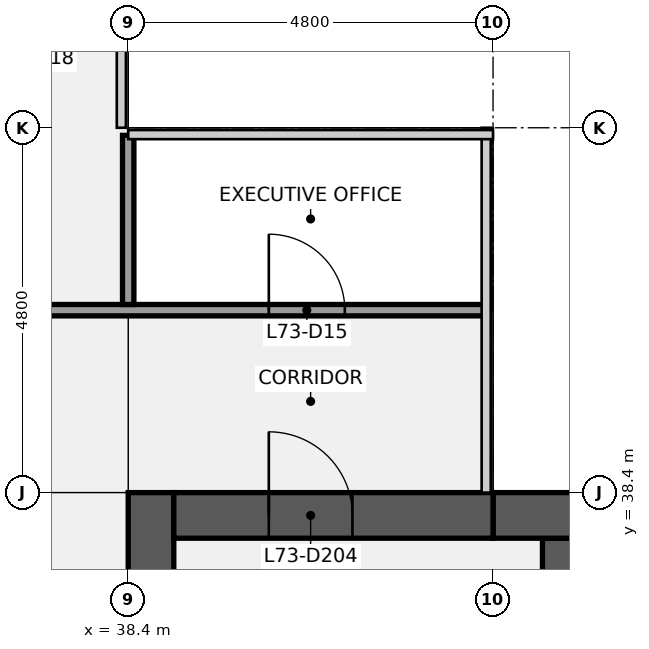
"""IFC4 building model, lengths in metres.
Left out: names, types, materials, properties, quantities, classifications, styles, units other than length and angle.
Written with IfcOpenShell. Run it as: python <this file> out.ifc"""

import sys

from ifc_helpers import new_model, si_unit, direction, frame, frame_2d, origin, place, context, subcontext, project, spatial, rectangle, extrude, element, fill, save


model = new_model("IFC4")
c1 = context("Model", 3, precision=1e-05, world=origin(), true_north=direction((0.0, 1.0)))
c2 = subcontext(c1, "Body", "Model", "MODEL_VIEW")
j1 = project(units=[si_unit("LENGTHUNIT", "METRE"), si_unit("PLANEANGLEUNIT", "RADIAN")], contexts=[c1])
p1 = place(None, origin())
s1 = spatial("IfcSite", under=j1, at=p1, CompositionType="ELEMENT")
p2 = place(p1, origin())
s2 = spatial("IfcBuilding", under=s1, at=p2, CompositionType="ELEMENT")
p3 = place(p2, frame((0.0, 0.0, 330.3)))
s3 = spatial("IfcBuildingStorey", under=s2, at=p3, CompositionType="ELEMENT", Elevation=330.3)
p4 = place(p3, frame((38.7, 9.6, 0.0), z_axis=(0.0, 0.0, 1.0), x_axis=(0.0, 1.0, 0.0)))
e1 = element("IfcWall", 1, at=p4, inside=s3, PredefinedType="SHEAR", context=c2, shape_type="SweptSolid", body=[
    extrude(rectangle(XDim=28.8, YDim=0.6, at=frame_2d((14.4, 0.0))), origin(), (0.0, 0.0, 1.0), 3.84),
])
p5 = place(p4, frame((8.7, 0.0, 0.0)))
e2 = element("IfcOpeningElement", 2, at=p5, cuts=e1, PredefinedType="OPENING", context=c2, shape_type="SweptSolid", body=[
    extrude(rectangle(XDim=1.8, YDim=2.1, at=frame_2d((0.9, 1.05))), frame((0.0, 0.31, 0.0), z_axis=(0.0, -1.0, 0.0), x_axis=(1.0, 0.0, 0.0)), (0.0, 0.0, 1.0), 0.62),
])
p6 = place(p4, frame((18.3, 0.0, 0.0)))
e3 = element("IfcOpeningElement", 3, at=p6, cuts=e1, PredefinedType="OPENING", context=c2, shape_type="SweptSolid", body=[
    extrude(rectangle(XDim=1.8, YDim=2.1, at=frame_2d((0.9, 1.05))), frame((0.0, 0.31, 0.0), z_axis=(0.0, -1.0, 0.0), x_axis=(1.0, 0.0, 0.0)), (0.0, 0.0, 1.0), 0.62),
])
p7 = place(p3, frame((43.85, 37.5, 0.0), z_axis=(0.0, 0.0, 1.0), x_axis=(1.0, 0.0, 0.0)))
e4 = element("IfcWall", 4, at=p7, inside=s3, PredefinedType="SHEAR", context=c2, shape_type="SweptSolid", body=[
    extrude(rectangle(XDim=7.5, YDim=0.6, at=frame_2d((3.75, 0.0))), origin(), (0.0, 0.0, 1.0), 3.84),
])
p8 = place(p3, frame((43.2, 38.1, 0.0), z_axis=(0.0, 0.0, 1.0), x_axis=(1.0, 0.0, 0.0)))
e5 = element("IfcWall", 5, at=p8, inside=s3, PredefinedType="SHEAR", context=c2, shape_type="SweptSolid", body=[
    extrude(rectangle(XDim=13.8, YDim=0.6, at=frame_2d((6.9, 0.0))), origin(), (0.0, 0.0, 1.0), 3.84),
])
p9 = place(p8, frame((6.3, 0.0, 0.9)))
e6 = element("IfcOpeningElement", 6, at=p9, cuts=e5, PredefinedType="OPENING", context=c2, shape_type="SweptSolid", body=[
    extrude(rectangle(XDim=1.8, YDim=1.5, at=frame_2d((0.9, 0.75))), frame((0.0, 0.31, 0.0), z_axis=(0.0, -1.0, 0.0), x_axis=(1.0, 0.0, 0.0)), (0.0, 0.0, 1.0), 0.62),
])
p10 = place(p8, frame((1.5, 0.0, 0.9)))
e7 = element("IfcOpeningElement", 7, at=p10, cuts=e5, PredefinedType="OPENING", context=c2, shape_type="SweptSolid", body=[
    extrude(rectangle(XDim=1.8, YDim=1.5, at=frame_2d((0.9, 0.75))), frame((0.0, 0.31, 0.0), z_axis=(0.0, -1.0, 0.0), x_axis=(1.0, 0.0, 0.0)), (0.0, 0.0, 1.0), 0.62),
])
p11 = place(p3, frame((39.0, 38.1, 0.0), z_axis=(0.0, 0.0, 1.0), x_axis=(1.0, 0.0, 0.0)))
e8 = element("IfcWall", 8, at=p11, inside=s3, PredefinedType="SHEAR", context=c2, shape_type="SweptSolid", body=[
    extrude(rectangle(XDim=4.2, YDim=0.6, at=frame_2d((2.1, 0.0))), origin(), (0.0, 0.0, 1.0), 3.84),
])
p12 = place(p11, frame((1.25, 0.0, 0.0)))
e9 = element("IfcOpeningElement", 9, at=p12, cuts=e8, PredefinedType="OPENING", context=c2, shape_type="SweptSolid", body=[
    extrude(rectangle(XDim=1.1, YDim=2.1, at=frame_2d((0.55, 1.05))), frame((0.0, 0.31, 0.0), z_axis=(0.0, -1.0, 0.0), x_axis=(1.0, 0.0, 0.0)), (0.0, 0.0, 1.0), 0.62),
])
p13 = place(p3, frame((14.5, 40.8, 0.0), z_axis=(0.0, 0.0, 1.0), x_axis=(1.0, 0.0, 0.0)))
e10 = element("IfcWall", 10, at=p13, inside=s3, PredefinedType="PARTITIONING", context=c2, shape_type="SweptSolid", body=[
    extrude(rectangle(XDim=28.6, YDim=0.15, at=frame_2d((14.3, 0.0))), origin(), (0.0, 0.0, 1.0), 2.87),
])
p14 = place(p13, frame((1.85, 0.0, 0.0)))
e11 = element("IfcOpeningElement", 11, at=p14, cuts=e10, PredefinedType="OPENING", context=c2, shape_type="SweptSolid", body=[
    extrude(rectangle(XDim=1.0, YDim=2.1, at=frame_2d((0.5, 1.05))), frame((0.0, 0.085, 0.0), z_axis=(0.0, -1.0, 0.0), x_axis=(1.0, 0.0, 0.0)), (0.0, 0.0, 1.0), 0.17),
])
p15 = place(p13, frame((9.0, 0.0, 0.0)))
e12 = element("IfcOpeningElement", 12, at=p15, cuts=e10, PredefinedType="OPENING", context=c2, shape_type="SweptSolid", body=[
    extrude(rectangle(XDim=1.0, YDim=2.1, at=frame_2d((0.5, 1.05))), frame((0.0, 0.085, 0.0), z_axis=(0.0, -1.0, 0.0), x_axis=(1.0, 0.0, 0.0)), (0.0, 0.0, 1.0), 0.17),
])
p16 = place(p13, frame((15.0, 0.0, 0.0)))
e13 = element("IfcOpeningElement", 13, at=p16, cuts=e10, PredefinedType="OPENING", context=c2, shape_type="SweptSolid", body=[
    extrude(rectangle(XDim=1.0, YDim=2.1, at=frame_2d((0.5, 1.05))), frame((0.0, 0.085, 0.0), z_axis=(0.0, -1.0, 0.0), x_axis=(1.0, 0.0, 0.0)), (0.0, 0.0, 1.0), 0.17),
])
p17 = place(p13, frame((19.8, 0.0, 0.0)))
e14 = element("IfcOpeningElement", 14, at=p17, cuts=e10, PredefinedType="OPENING", context=c2, shape_type="SweptSolid", body=[
    extrude(rectangle(XDim=1.0, YDim=2.1, at=frame_2d((0.5, 1.05))), frame((0.0, 0.085, 0.0), z_axis=(0.0, -1.0, 0.0), x_axis=(1.0, 0.0, 0.0)), (0.0, 0.0, 1.0), 0.17),
])
p18 = place(p13, frame((25.75, 0.0, 0.0)))
e15 = element("IfcOpeningElement", 15, at=p18, cuts=e10, PredefinedType="OPENING", context=c2, shape_type="SweptSolid", body=[
    extrude(rectangle(XDim=1.0, YDim=2.1, at=frame_2d((0.5, 1.05))), frame((0.0, 0.085, 0.0), z_axis=(0.0, -1.0, 0.0), x_axis=(1.0, 0.0, 0.0)), (0.0, 0.0, 1.0), 0.17),
])
p19 = place(p3, frame((38.4, 40.875, 0.0), z_axis=(0.0, 0.0, 1.0), x_axis=(0.0, 1.0, 0.0)))
e16 = element("IfcWall", 16, at=p19, inside=s3, PredefinedType="PARTITIONING", context=c2, shape_type="SweptSolid", body=[
    extrude(rectangle(XDim=2.225, YDim=0.15, at=frame_2d((1.113, 0.0))), origin(), (0.0, 0.0, 1.0), 2.87),
])
p20 = place(p12, origin())
e17 = element("IfcDoor", 17, at=p20, inside=s3, OperationType="SINGLE_SWING_LEFT", PredefinedType="DOOR", context=c2, shape_type="SweptSolid", body=[
    extrude(rectangle(XDim=1.1, YDim=2.1, at=frame_2d((0.55, 1.05))), frame((0.0, 0.025, 0.0), z_axis=(0.0, -1.0, 0.0), x_axis=(1.0, 0.0, 0.0)), (0.0, 0.0, 1.0), 0.05),
])
fill(e9, e17)
p21 = place(p18, origin())
e18 = element("IfcDoor", 18, at=p21, inside=s3, OperationType="SINGLE_SWING_LEFT", PredefinedType="DOOR", context=c2, shape_type="SweptSolid", body=[
    extrude(rectangle(XDim=1.0, YDim=2.1, at=frame_2d((0.5, 1.05))), frame((0.0, 0.025, 0.0), z_axis=(0.0, -1.0, 0.0), x_axis=(1.0, 0.0, 0.0)), (0.0, 0.0, 1.0), 0.05),
])
fill(e15, e18)
save(model, sys.argv[1])
